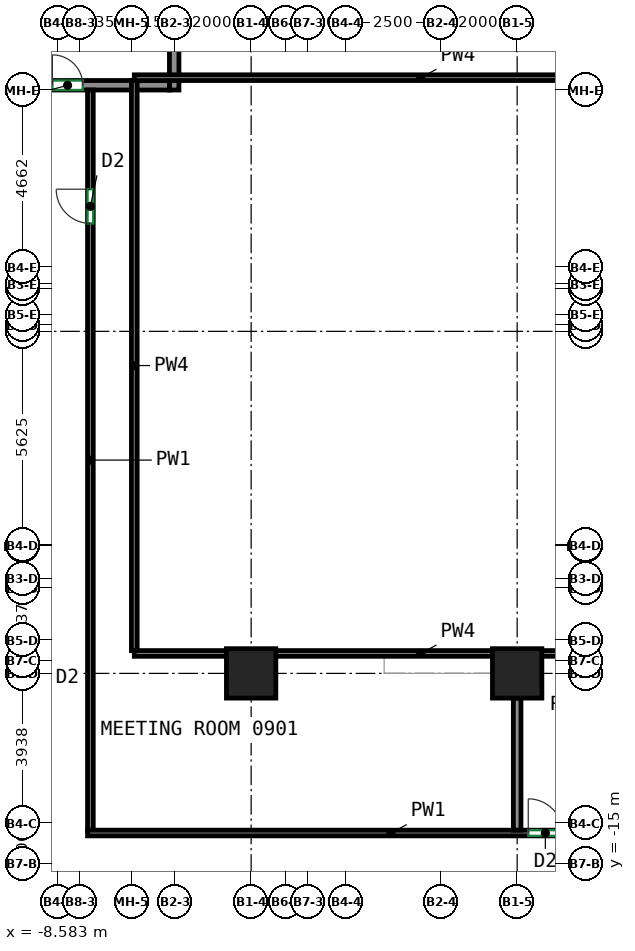
"""IFC4 building model, lengths in metres.
Left out: names, types, materials, properties, quantities, classifications, styles, units other than length and angle.
Written with IfcOpenShell. Run it as: python <this file> out.ifc"""

import sys

from ifc_helpers import new_model, si_unit, direction, frame, frame_2d, origin, origin_2d, place, context, subcontext, project, spatial, rectangle, extrude, source, transform, mapped, element, fill, save


model = new_model("IFC4")
c1 = context("Model", 3, precision=1e-05, world=origin(), true_north=direction((0.0, 1.0)))
c2 = subcontext(c1, "Body", "Model", "MODEL_VIEW")
j1 = project(units=[si_unit("LENGTHUNIT", "METRE"), si_unit("PLANEANGLEUNIT", "RADIAN")], contexts=[c1])
p1 = place(None, origin())
s1 = spatial("IfcSite", under=j1, at=p1, CompositionType="ELEMENT")
p2 = place(p1, origin())
s2 = spatial("IfcBuilding", under=s1, at=p2, CompositionType="ELEMENT")
p3 = place(p2, frame((0.0, 0.0, 43.0)))
s3 = spatial("IfcBuildingStorey", under=s2, at=p3, CompositionType="ELEMENT", Elevation=43.0)
m1 = source(origin(), c2, "Body", "SweptSolid", [
    extrude(rectangle(XDim=1.3, YDim=1.3, at=origin_2d()), origin(), (0.0, 0.0, 1.0), 3.72),
])
for number, where, z_axis, x_axis in (
    (1, (-3.5, -10.0, 0.0), (0.0, 0.0, 1.0), (1.0, 0.0, 0.0)),
    (2, (3.5, -10.0, 0.0), (0.0, 0.0, 1.0), (1.0, 0.0, 0.0)),
):
    element("IfcColumn", number, at=place(p3, frame(where, z_axis=z_axis, x_axis=x_axis)), inside=s3, PredefinedType="COLUMN", context=c2, shape_type="MappedRepresentation", body=[
        mapped(m1, transform((0.0, 0.0, 0.0))),
    ])
m2 = source(origin(), c2, "Body", "SweptSolid", [
    extrude(rectangle(XDim=2.65, YDim=0.25, at=frame_2d((1.325, 0.0))), origin(), (0.0, 0.0, 1.0), 3.72),
])
p4 = place(p3, frame((-5.525, 5.35, 0.0), z_axis=(0.0, 0.0, 1.0), x_axis=(0.0, 1.0, 0.0)))
e3 = element("IfcWall", 3, at=p4, inside=s3, PredefinedType="PARTITIONING", context=c2, shape_type="MappedRepresentation", body=[
    mapped(m2, transform((0.0, 0.0, 0.0))),
])
m3 = source(origin(), c2, "Body", "SweptSolid", [
    extrude(rectangle(XDim=5.36, YDim=0.25, at=frame_2d((2.68, 0.0))), origin(), (0.0, 0.0, 1.0), 3.72),
])
p5 = place(p3, frame((-11.01, 5.475, 0.0), z_axis=(0.0, 0.0, 1.0), x_axis=(1.0, 0.0, 0.0)))
e4 = element("IfcWall", 4, at=p5, inside=s3, PredefinedType="PARTITIONING", context=c2, shape_type="MappedRepresentation", body=[
    mapped(m3, transform((0.0, 0.0, 0.0))),
])
p6 = place(p5, frame((2.28, 0.0, 0.0)))
e5 = element("IfcOpeningElement", 5, at=p6, cuts=e4, PredefinedType="OPENING", context=c2, shape_type="SweptSolid", body=[
    extrude(rectangle(XDim=0.8, YDim=2.0, at=frame_2d((0.4, 1.0))), frame((0.0, 0.135, 0.0), z_axis=(0.0, -1.0, 0.0), x_axis=(1.0, 0.0, 0.0)), (0.0, 0.0, 1.0), 0.27),
])
p7 = place(p3, frame((-7.73, -14.125, 0.0), z_axis=(0.0, 0.0, 1.0), x_axis=(0.0, 1.0, 0.0)))
e6 = element("IfcWall", 6, at=p7, inside=s3, PredefinedType="PARTITIONING", context=c2, shape_type="SweptSolid", body=[
    extrude(rectangle(XDim=19.475, YDim=0.15, at=frame_2d((9.738, 0.0))), origin(), (0.0, 0.0, 1.0), 3.72),
])
p8 = place(p7, frame((15.965, 0.0, 0.0)))
e7 = element("IfcOpeningElement", 7, at=p8, cuts=e6, PredefinedType="OPENING", context=c2, shape_type="SweptSolid", body=[
    extrude(rectangle(XDim=0.9, YDim=2.1, at=frame_2d((0.45, 1.05))), frame((0.0, 0.085, 0.0), z_axis=(0.0, -1.0, 0.0), x_axis=(1.0, 0.0, 0.0)), (0.0, 0.0, 1.0), 0.17),
])
p9 = place(p3, frame((-7.805, -14.2, 0.0), z_axis=(0.0, 0.0, 1.0), x_axis=(1.0, 0.0, 0.0)))
e8 = element("IfcWall", 8, at=p9, inside=s3, PredefinedType="PARTITIONING", context=c2, shape_type="SweptSolid", body=[
    extrude(rectangle(XDim=15.97, YDim=0.15, at=frame_2d((7.985, 0.0))), origin(), (0.0, 0.0, 1.0), 3.72),
])
p10 = place(p9, frame((11.597, 0.0, 0.0)))
e9 = element("IfcOpeningElement", 9, at=p10, cuts=e8, PredefinedType="OPENING", context=c2, shape_type="SweptSolid", body=[
    extrude(rectangle(XDim=0.9, YDim=2.1, at=frame_2d((0.45, 1.05))), frame((0.0, 0.085, 0.0), z_axis=(0.0, -1.0, 0.0), x_axis=(1.0, 0.0, 0.0)), (0.0, 0.0, 1.0), 0.17),
])
p11 = place(p3, frame((3.5, -14.124, 0.0), z_axis=(0.0, 0.0, 1.0), x_axis=(0.0, 1.0, 0.0)))
e10 = element("IfcWall", 10, at=p11, inside=s3, PredefinedType="PARTITIONING", context=c2, shape_type="SweptSolid", body=[
    extrude(rectangle(XDim=3.474, YDim=0.2, at=frame_2d((1.737, 0.0))), origin(), (0.0, 0.0, 1.0), 3.07),
])
p12 = place(p3, frame((8.5, -9.475, 0.0), z_axis=(0.0, 0.0, 1.0), x_axis=(-1.0, 0.0, 0.0)))
e11 = element("IfcWall", 11, at=p12, inside=s3, PredefinedType="PARTITIONING", context=c2, shape_type="SweptSolid", body=[
    extrude(rectangle(XDim=15.075, YDim=0.15, at=frame_2d((7.538, 0.0))), origin(), (0.0, 0.0, 1.0), 3.72),
])
p13 = place(p3, frame((-6.575, -9.4, 0.0), z_axis=(0.0, 0.0, 1.0), x_axis=(0.0, 1.0, 0.0)))
e12 = element("IfcWall", 12, at=p13, inside=s3, PredefinedType="PARTITIONING", context=c2, shape_type="SweptSolid", body=[
    extrude(rectangle(XDim=15.0, YDim=0.15, at=frame_2d((7.5, 0.0))), origin(), (0.0, 0.0, 1.0), 3.72),
])
p14 = place(p3, frame((-6.575, 5.675, 0.0), z_axis=(0.0, 0.0, 1.0), x_axis=(1.0, 0.0, 0.0)))
e13 = element("IfcWall", 13, at=p14, inside=s3, PredefinedType="PARTITIONING", context=c2, shape_type="SweptSolid", body=[
    extrude(rectangle(XDim=15.075, YDim=0.15, at=frame_2d((7.538, 0.0))), origin(), (0.0, 0.0, 1.0), 3.72),
])
p15 = place(p6, origin())
e14 = element("IfcDoor", 14, at=p15, inside=s3, OperationType="SINGLE_SWING_LEFT", PredefinedType="DOOR", context=c2, shape_type="SweptSolid", body=[
    extrude(rectangle(XDim=0.8, YDim=2.0, at=frame_2d((0.4, 1.0))), frame((0.0, 0.025, 0.0), z_axis=(0.0, -1.0, 0.0), x_axis=(1.0, 0.0, 0.0)), (0.0, 0.0, 1.0), 0.05),
])
fill(e5, e14)
p16 = place(p10, origin())
e15 = element("IfcDoor", 15, at=p16, inside=s3, OperationType="SINGLE_SWING_LEFT", PredefinedType="DOOR", context=c2, shape_type="SweptSolid", body=[
    extrude(rectangle(XDim=0.9, YDim=2.1, at=frame_2d((0.45, 1.05))), frame((0.0, 0.025, 0.0), z_axis=(0.0, -1.0, 0.0), x_axis=(1.0, 0.0, 0.0)), (0.0, 0.0, 1.0), 0.05),
])
fill(e9, e15)
p17 = place(p8, origin())
e16 = element("IfcDoor", 16, at=p17, inside=s3, OperationType="SINGLE_SWING_RIGHT", PredefinedType="DOOR", context=c2, shape_type="SweptSolid", body=[
    extrude(rectangle(XDim=0.9, YDim=2.1, at=frame_2d((0.45, 1.05))), frame((0.0, 0.025, 0.0), z_axis=(0.0, -1.0, 0.0), x_axis=(1.0, 0.0, 0.0)), (0.0, 0.0, 1.0), 0.05),
])
fill(e7, e16)
save(model, sys.argv[1])
